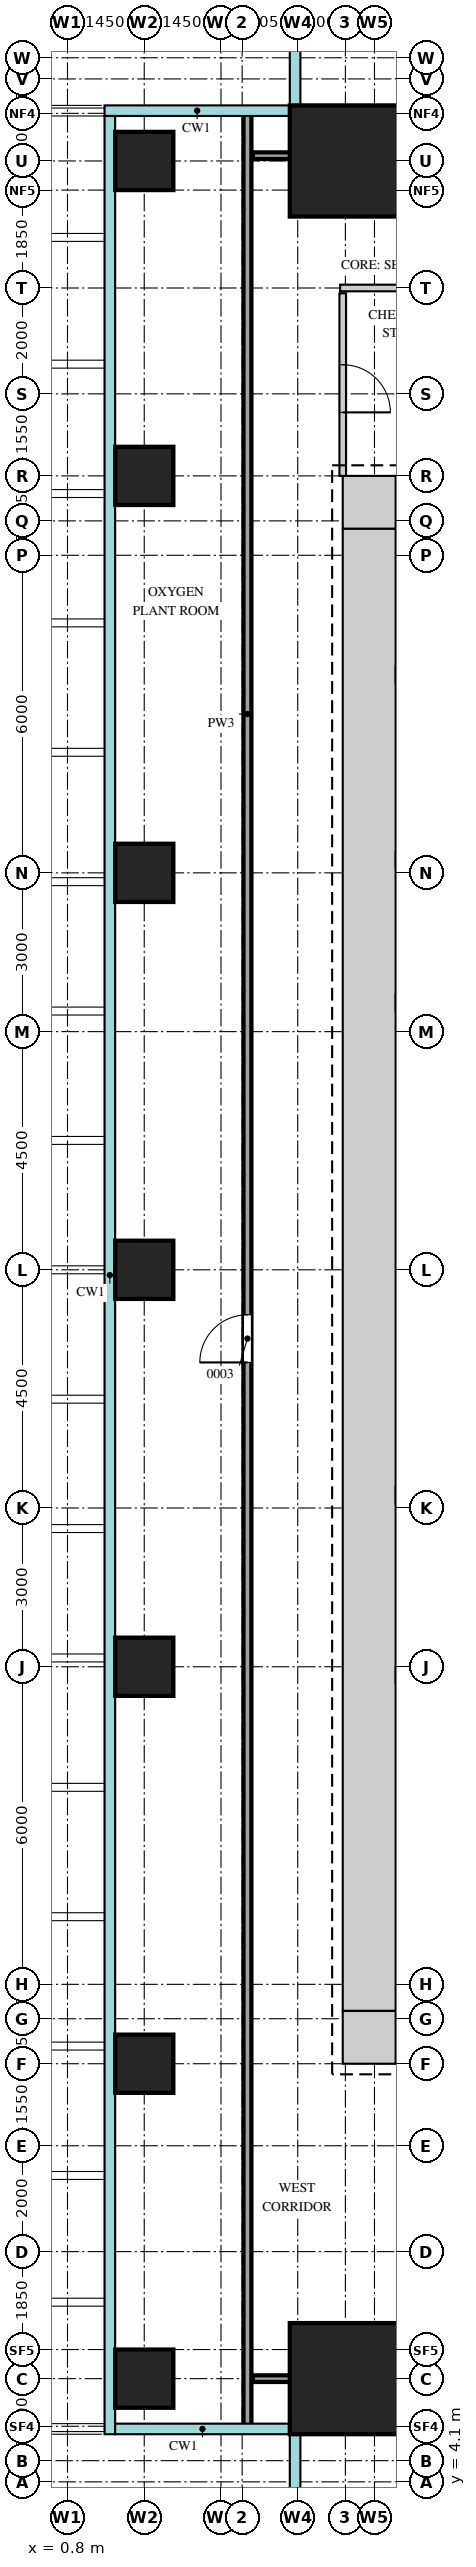
"""IFC4 building model, lengths in metres.
Left out: names, types, materials, properties, quantities, classifications, styles, units other than length and angle.
Written with IfcOpenShell. Run it as: python <this file> out.ifc"""

import sys

from ifc_helpers import new_model, si_unit, direction, frame, frame_2d, origin, origin_2d, place, context, subcontext, project, spatial, rectangle, extrude, source, transform, mapped, element, fill, save


model = new_model("IFC4")
c1 = context("Model", 3, precision=1e-05, world=origin(), true_north=direction((0.0, 1.0)))
c2 = subcontext(c1, "Body", "Model", "MODEL_VIEW")
j1 = project(units=[si_unit("LENGTHUNIT", "METRE"), si_unit("PLANEANGLEUNIT", "RADIAN")], contexts=[c1])
p1 = place(None, origin())
s1 = spatial("IfcSite", under=j1, at=p1, CompositionType="ELEMENT")
p2 = place(p1, origin())
s2 = spatial("IfcBuilding", under=s1, at=p2, CompositionType="ELEMENT")
p3 = place(p2, frame((0.0, 0.0, 141.1)))
s3 = spatial("IfcBuildingStorey", under=s2, at=p3, CompositionType="ELEMENT", Elevation=141.1)
m1 = source(origin(), c2, "Body", "SweptSolid", [
    extrude(rectangle(XDim=1.0, YDim=1.0, at=frame_2d((0.5, 0.0))), origin(), (0.0, 0.0, 1.0), 4.1),
])
for number, where, z_axis, x_axis in (
    (1, (6.0, 41.5, 0.0), (0.0, 0.0, 1.0), (1.0, 0.0, 0.0)),
    (2, (6.0, 12.5, 0.0), (0.0, 0.0, 1.0), (1.0, 0.0, 0.0)),
):
    element("IfcWall", number, at=place(p3, frame(where, z_axis=z_axis, x_axis=x_axis)), inside=s3, PredefinedType="SHEAR", context=c2, shape_type="MappedRepresentation", body=[
        mapped(m1, transform((0.0, 0.0, 0.0))),
    ])
m2 = source(origin(), c2, "Body", "SweptSolid", [
    extrude(rectangle(XDim=28.0, YDim=1.0, at=frame_2d((14.0, 0.0))), origin(), (0.0, 0.0, 1.0), 4.1),
])
p4 = place(p3, frame((6.5, 13.0, 0.0), z_axis=(0.0, 0.0, 1.0), x_axis=(0.0, 1.0, 0.0)))
e3 = element("IfcWall", 3, at=p4, inside=s3, PredefinedType="SHEAR", context=c2, shape_type="MappedRepresentation", body=[
    mapped(m2, transform((0.0, 0.0, 0.0))),
])
m3 = source(origin(), c2, "Body", "SweptSolid", [
    extrude(rectangle(XDim=2.1, YDim=2.1, at=origin_2d()), origin(), (0.0, 0.0, 1.0), 4.4),
])
for number, where, z_axis, x_axis in (
    (4, (6.05, 47.95, 0.0), (0.0, 0.0, 1.0), (1.0, 0.0, 0.0)),
    (5, (6.05, 6.05, 0.0), (0.0, 0.0, 1.0), (1.0, 0.0, 0.0)),
):
    element("IfcColumn", number, at=place(p3, frame(where, z_axis=z_axis, x_axis=x_axis)), inside=s3, PredefinedType="COLUMN", context=c2, shape_type="MappedRepresentation", body=[
        mapped(m3, transform((0.0, 0.0, 0.0))),
    ])
m4 = source(origin(), c2, "Body", "SweptSolid", [
    extrude(rectangle(XDim=1.1, YDim=1.1, at=origin_2d()), origin(), (0.0, 0.0, 1.0), 4.1),
])
for number, where, z_axis, x_axis in (
    (6, (2.25, 6.05, 0.0), (0.0, 0.0, 1.0), (1.0, 0.0, 0.0)),
    (7, (2.25, 12.0, 0.0), (0.0, 0.0, 1.0), (1.0, 0.0, 0.0)),
    (8, (2.25, 19.5, 0.0), (0.0, 0.0, 1.0), (1.0, 0.0, 0.0)),
    (9, (2.25, 27.0, 0.0), (0.0, 0.0, 1.0), (1.0, 0.0, 0.0)),
    (10, (2.25, 34.5, 0.0), (0.0, 0.0, 1.0), (1.0, 0.0, 0.0)),
    (11, (2.25, 42.0, 0.0), (0.0, 0.0, 1.0), (1.0, 0.0, 0.0)),
    (12, (2.25, 47.95, 0.0), (0.0, 0.0, 1.0), (1.0, 0.0, 0.0)),
):
    element("IfcColumn", number, at=place(p3, frame(where, z_axis=z_axis, x_axis=x_axis)), inside=s3, PredefinedType="COLUMN", context=c2, shape_type="MappedRepresentation", body=[
        mapped(m4, transform((0.0, 0.0, 0.0))),
    ])
m5 = source(origin(), c2, "Body", "SweptSolid", [
    extrude(rectangle(XDim=43.7, YDim=0.15, at=frame_2d((21.85, 0.0))), origin(), (0.0, 0.0, 1.0), 4.2),
])
p5 = place(p3, frame((4.2, 5.15, 0.0), z_axis=(0.0, 0.0, 1.0), x_axis=(0.0, 1.0, 0.0)))
e13 = element("IfcWall", 13, at=p5, inside=s3, PredefinedType="PARTITIONING", context=c2, shape_type="MappedRepresentation", body=[
    mapped(m5, transform((0.0, 0.0, 0.0))),
])
m6 = source(origin(), c2, "Body", "SweptSolid", [
    extrude(rectangle(XDim=0.9, YDim=2.1, at=frame_2d((0.45, 1.05))), frame((0.0, 0.085, 0.0), z_axis=(0.0, -1.0, 0.0), x_axis=(1.0, 0.0, 0.0)), (0.0, 0.0, 1.0), 0.17),
])
p6 = place(p5, frame((20.1, 0.0, 0.0)))
e14 = element("IfcOpeningElement", 14, at=p6, cuts=e13, PredefinedType="OPENING", context=c2, shape_type="MappedRepresentation", body=[
    mapped(m6, transform((0.0, 0.0, 0.0))),
])
m7 = source(origin(), c2, "Body", "SweptSolid", [
    extrude(rectangle(XDim=7.65, YDim=0.125, at=frame_2d((3.825, 0.0))), origin(), (0.0, 0.0, 1.0), 3.55),
])
p7 = place(p3, frame((4.3, 6.05, 0.0), z_axis=(0.0, 0.0, 1.0), x_axis=(1.0, 0.0, 0.0)))
e15 = element("IfcWall", 15, at=p7, inside=s3, PredefinedType="PARTITIONING", context=c2, shape_type="MappedRepresentation", body=[
    mapped(m7, transform((0.0, 0.0, 0.0))),
])
m8 = source(origin(), c2, "Body", "SweptSolid", [
    extrude(rectangle(XDim=0.9, YDim=2.1, at=frame_2d((0.45, 1.05))), frame((0.0, 0.073, 0.0), z_axis=(0.0, -1.0, 0.0), x_axis=(1.0, 0.0, 0.0)), (0.0, 0.0, 1.0), 0.145),
])
p8 = place(p7, frame((3.35, 0.0, 0.0)))
e16 = element("IfcOpeningElement", 16, at=p8, cuts=e15, PredefinedType="OPENING", context=c2, shape_type="MappedRepresentation", body=[
    mapped(m8, transform((0.0, 0.0, 0.0))),
])
m9 = source(origin(), c2, "Body", "SweptSolid", [
    extrude(rectangle(XDim=3.45, YDim=0.125, at=frame_2d((1.725, 0.0))), origin(), (0.0, 0.0, 1.0), 4.2),
])
p9 = place(p3, frame((6.0, 42.0, 0.0), z_axis=(0.0, 0.0, 1.0), x_axis=(0.0, 1.0, 0.0)))
e17 = element("IfcWall", 17, at=p9, inside=s3, PredefinedType="PARTITIONING", context=c2, shape_type="MappedRepresentation", body=[
    mapped(m9, transform((0.0, 0.0, 0.0))),
])
p10 = place(p9, frame((1.2, 0.0, 0.0)))
e18 = element("IfcOpeningElement", 18, at=p10, cuts=e17, PredefinedType="OPENING", context=c2, shape_type="MappedRepresentation", body=[
    mapped(m8, transform((0.0, 0.0, 0.0))),
])
m10 = source(origin(), c2, "Body", "SweptSolid", [
    extrude(rectangle(XDim=7.95, YDim=0.125, at=frame_2d((3.975, 0.0))), origin(), (0.0, 0.0, 1.0), 4.2),
])
p11 = place(p3, frame((5.95, 45.55, 0.0), z_axis=(0.0, 0.0, 1.0), x_axis=(1.0, 0.0, 0.0)))
e19 = element("IfcWall", 19, at=p11, inside=s3, PredefinedType="PARTITIONING", context=c2, shape_type="MappedRepresentation", body=[
    mapped(m10, transform((0.0, 0.0, 0.0))),
])
p12 = place(p11, frame((3.3, 0.0, 0.0)))
e20 = element("IfcOpeningElement", 20, at=p12, cuts=e19, PredefinedType="OPENING", context=c2, shape_type="MappedRepresentation", body=[
    mapped(m8, transform((0.0, 0.0, 0.0))),
])
p13 = place(p11, frame((6.1, 0.0, 0.0)))
e21 = element("IfcOpeningElement", 21, at=p13, cuts=e19, PredefinedType="OPENING", context=c2, shape_type="MappedRepresentation", body=[
    mapped(m8, transform((0.0, 0.0, 0.0))),
])
m11 = source(origin(), c2, "Body", "SweptSolid", [
    extrude(rectangle(XDim=42.05, YDim=0.125, at=frame_2d((21.025, 0.0))), origin(), (0.0, 0.0, 1.0), 3.55),
])
p14 = place(p3, frame((4.3, 48.05, 0.0), z_axis=(0.0, 0.0, 1.0), x_axis=(1.0, 0.0, 0.0)))
e22 = element("IfcWall", 22, at=p14, inside=s3, PredefinedType="PARTITIONING", context=c2, shape_type="MappedRepresentation", body=[
    mapped(m11, transform((0.0, 0.0, 0.0))),
])
p15 = place(p14, frame((7.1, 0.0, 0.0)))
e23 = element("IfcOpeningElement", 23, at=p15, cuts=e22, PredefinedType="OPENING", context=c2, shape_type="MappedRepresentation", body=[
    mapped(m8, transform((0.0, 0.0, 0.0))),
])
m12 = source(origin(), c2, "Body", "SweptSolid", [
    extrude(rectangle(XDim=1.2, YDim=2.1, at=frame_2d((0.6, 1.05))), frame((0.0, 0.073, 0.0), z_axis=(0.0, -1.0, 0.0), x_axis=(1.0, 0.0, 0.0)), (0.0, 0.0, 1.0), 0.145),
])
p16 = place(p14, frame((28.2, 0.0, 0.0)))
e24 = element("IfcOpeningElement", 24, at=p16, cuts=e22, PredefinedType="OPENING", context=c2, shape_type="MappedRepresentation", body=[
    mapped(m12, transform((0.0, 0.0, 0.0))),
])
m13 = source(origin(), c2, "Body", "SweptSolid", [
    extrude(rectangle(XDim=0.9, YDim=2.1, at=frame_2d((0.45, 1.05))), frame((0.0, 0.025, 0.0), z_axis=(0.0, -1.0, 0.0), x_axis=(1.0, 0.0, 0.0)), (0.0, 0.0, 1.0), 0.05),
])
p17 = place(p6, origin())
e25 = element("IfcDoor", 25, at=p17, inside=s3, OperationType="SINGLE_SWING_RIGHT", PredefinedType="DOOR", context=c2, shape_type="MappedRepresentation", body=[
    mapped(m13, transform((0.0, 0.0, 0.0))),
])
fill(e14, e25)
p18 = place(p10, origin())
e26 = element("IfcDoor", 26, at=p18, inside=s3, OperationType="SINGLE_SWING_LEFT", PredefinedType="DOOR", context=c2, shape_type="MappedRepresentation", body=[
    mapped(m13, transform((0.0, 0.0, 0.0))),
])
fill(e18, e26)
save(model, sys.argv[1])
